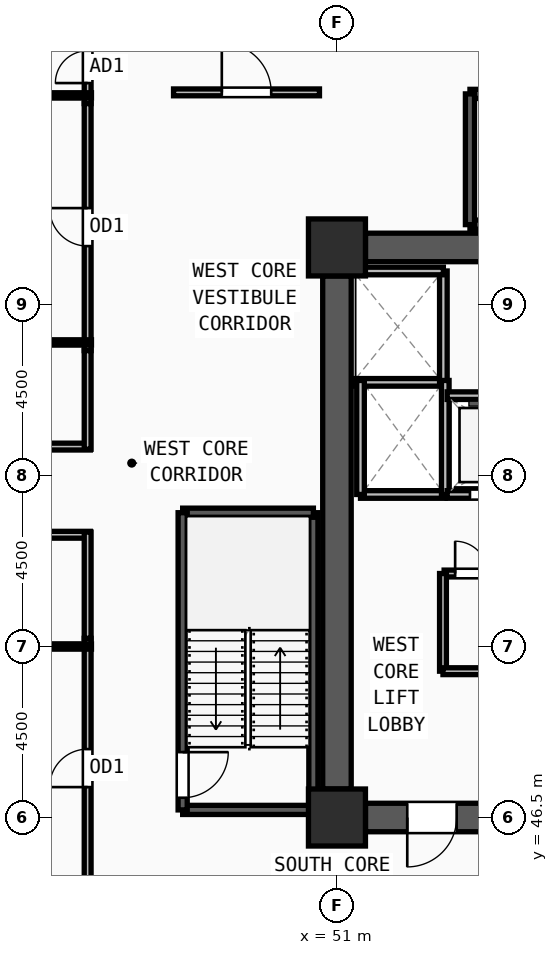
"""IFC4 building model, lengths in metres.
Left out: names, types, materials, properties, quantities, classifications, styles, units other than length and angle.
Written with IfcOpenShell. Run it as: python <this file> out.ifc"""

import sys

from ifc_helpers import new_model, si_unit, direction, frame, frame_2d, origin, origin_2d, place, context, subcontext, project, spatial, rectangle, extrude, source, transform, mapped, element, fill, save


model = new_model("IFC4")
c1 = context("Model", 3, precision=1e-05, world=origin(), true_north=direction((0.0, 1.0)))
c2 = subcontext(c1, "Body", "Model", "MODEL_VIEW")
j1 = project(units=[si_unit("LENGTHUNIT", "METRE"), si_unit("PLANEANGLEUNIT", "RADIAN")], contexts=[c1])
p1 = place(None, origin())
s1 = spatial("IfcSite", under=j1, at=p1, CompositionType="ELEMENT")
p2 = place(p1, origin())
s2 = spatial("IfcBuilding", under=s1, at=p2, CompositionType="ELEMENT")
p3 = place(p2, frame((0.0, 0.0, 135.75)))
s3 = spatial("IfcBuildingStorey", under=s2, at=p3, CompositionType="ELEMENT", Elevation=135.75)
m1 = source(origin(), c2, "Body", "SweptSolid", [
    extrude(rectangle(XDim=1.5, YDim=1.5, at=origin_2d()), origin(), (0.0, 0.0, 1.0), 3.75),
])
for number, where, z_axis, x_axis in (
    (1, (51.0, 46.5, 0.0), (0.0, 0.0, 1.0), (1.0, 0.0, 0.0)),
    (2, (51.0, 61.5, 0.0), (0.0, 0.0, 1.0), (1.0, 0.0, 0.0)),
):
    element("IfcColumn", number, at=place(p3, frame(where, z_axis=z_axis, x_axis=x_axis)), inside=s3, PredefinedType="COLUMN", context=c2, shape_type="MappedRepresentation", body=[
        mapped(m1, transform((0.0, 0.0, 0.0), x_axis=(1.0, 0.0, 0.0), y_axis=(0.0, 1.0, 0.0), z_axis=(0.0, 0.0, 1.0), scale=1.0)),
    ])
p4 = place(p3, frame((51.75, 61.5, 0.0), z_axis=(0.0, 0.0, 1.0), x_axis=(1.0, 0.0, 0.0)))
e3 = element("IfcWall", 3, at=p4, inside=s3, PredefinedType="SHEAR", context=c2, shape_type="SweptSolid", body=[
    extrude(rectangle(XDim=7.5, YDim=0.75, at=frame_2d((3.75, 0.0))), origin(), (0.0, 0.0, 1.0), 3.47),
])
p5 = place(p3, frame((59.25, 46.5, 0.0), z_axis=(0.0, 0.0, 1.0), x_axis=(-1.0, 0.0, 0.0)))
e4 = element("IfcWall", 4, at=p5, inside=s3, PredefinedType="SHEAR", context=c2, shape_type="SweptSolid", body=[
    extrude(rectangle(XDim=7.5, YDim=0.75, at=frame_2d((3.75, 0.0))), origin(), (0.0, 0.0, 1.0), 3.47),
])
m2 = source(origin(), c2, "Body", "SweptSolid", [
    extrude(rectangle(XDim=1.3, YDim=2.2, at=frame_2d((0.65, 1.1))), frame((0.0, 0.385, 0.0), z_axis=(0.0, -1.0, 0.0), x_axis=(1.0, 0.0, 0.0)), (0.0, 0.0, 1.0), 0.77),
])
p6 = place(p5, frame((5.1, 0.0, 0.0)))
e5 = element("IfcOpeningElement", 5, at=p6, cuts=e4, PredefinedType="OPENING", context=c2, shape_type="MappedRepresentation", body=[
    mapped(m2, transform((0.0, 0.0, 0.0), x_axis=(1.0, 0.0, 0.0), y_axis=(0.0, 1.0, 0.0), z_axis=(0.0, 0.0, 1.0), scale=1.0)),
])
m3 = source(origin(), c2, "Body", "SweptSolid", [
    extrude(rectangle(XDim=1.0, YDim=2.2, at=frame_2d((0.5, 1.1))), frame((0.0, 0.385, 0.0), z_axis=(0.0, -1.0, 0.0), x_axis=(1.0, 0.0, 0.0)), (0.0, 0.0, 1.0), 0.77),
])
p7 = place(p5, frame((0.6, 0.0, 0.0)))
e6 = element("IfcOpeningElement", 6, at=p7, cuts=e4, PredefinedType="OPENING", context=c2, shape_type="MappedRepresentation", body=[
    mapped(m3, transform((0.0, 0.0, 0.0), x_axis=(1.0, 0.0, 0.0), y_axis=(0.0, 1.0, 0.0), z_axis=(0.0, 0.0, 1.0), scale=1.0)),
])
p8 = place(p3, frame((51.0, 47.25, 0.0), z_axis=(0.0, 0.0, 1.0), x_axis=(0.0, 1.0, 0.0)))
e7 = element("IfcWall", 7, at=p8, inside=s3, PredefinedType="SHEAR", context=c2, shape_type="SweptSolid", body=[
    extrude(rectangle(XDim=13.5, YDim=0.75, at=frame_2d((6.75, 0.0))), origin(), (0.0, 0.0, 1.0), 3.47),
])
p9 = place(p3, frame((46.94, 46.7, 0.0), z_axis=(0.0, 0.0, 1.0), x_axis=(1.0, 0.0, 0.0)))
e8 = element("IfcWall", 8, at=p9, inside=s3, PredefinedType="SOLIDWALL", context=c2, shape_type="SweptSolid", body=[
    extrude(rectangle(XDim=3.44, YDim=0.24, at=frame_2d((1.72, 0.0))), origin(), (0.0, 0.0, 1.0), 3.47),
])
p10 = place(p3, frame((50.38, 46.7, 0.0), z_axis=(0.0, 0.0, 1.0), x_axis=(0.0, 1.0, 0.0)))
e9 = element("IfcWall", 9, at=p10, inside=s3, PredefinedType="SOLIDWALL", context=c2, shape_type="SweptSolid", body=[
    extrude(rectangle(XDim=7.82, YDim=0.24, at=frame_2d((3.91, 0.0))), origin(), (0.0, 0.0, 1.0), 3.47),
])
p11 = place(p3, frame((50.38, 54.52, 0.0), z_axis=(0.0, 0.0, 1.0), x_axis=(-1.0, 0.0, 0.0)))
e10 = element("IfcWall", 10, at=p11, inside=s3, PredefinedType="SOLIDWALL", context=c2, shape_type="SweptSolid", body=[
    extrude(rectangle(XDim=3.44, YDim=0.24, at=frame_2d((1.72, 0.0))), origin(), (0.0, 0.0, 1.0), 3.47),
])
p12 = place(p3, frame((46.94, 54.52, 0.0), z_axis=(0.0, 0.0, 1.0), x_axis=(0.0, -1.0, 0.0)))
e11 = element("IfcWall", 11, at=p12, inside=s3, PredefinedType="SOLIDWALL", context=c2, shape_type="SweptSolid", body=[
    extrude(rectangle(XDim=7.82, YDim=0.24, at=frame_2d((3.91, 0.0))), origin(), (0.0, 0.0, 1.0), 3.47),
])
m4 = source(origin(), c2, "Body", "SweptSolid", [
    extrude(rectangle(XDim=1.2, YDim=2.2, at=frame_2d((0.6, 1.1))), frame((0.0, 0.13, 0.0), z_axis=(0.0, -1.0, 0.0), x_axis=(1.0, 0.0, 0.0)), (0.0, 0.0, 1.0), 0.26),
])
p13 = place(p12, frame((6.3, 0.0, 0.0)))
e12 = element("IfcOpeningElement", 12, at=p13, cuts=e11, PredefinedType="OPENING", context=c2, shape_type="MappedRepresentation", body=[
    mapped(m4, transform((0.0, 0.0, 0.0), x_axis=(1.0, 0.0, 0.0), y_axis=(0.0, 1.0, 0.0), z_axis=(0.0, 0.0, 1.0), scale=1.0)),
])
p14 = place(p3, frame((54.5, 62.1, 0.0), z_axis=(0.0, 0.0, 1.0), x_axis=(1.0, 0.0, 0.0)))
e13 = element("IfcWall", 13, at=p14, inside=s3, PredefinedType="SOLIDWALL", context=c2, shape_type="SweptSolid", body=[
    extrude(rectangle(XDim=7.82, YDim=0.24, at=frame_2d((3.91, 0.0))), origin(), (0.0, 0.0, 1.0), 3.47),
])
p15 = place(p3, frame((62.32, 65.54, 0.0), z_axis=(0.0, 0.0, 1.0), x_axis=(-1.0, 0.0, 0.0)))
e14 = element("IfcWall", 14, at=p15, inside=s3, PredefinedType="SOLIDWALL", context=c2, shape_type="SweptSolid", body=[
    extrude(rectangle(XDim=7.82, YDim=0.24, at=frame_2d((3.91, 0.0))), origin(), (0.0, 0.0, 1.0), 3.47),
])
p16 = place(p15, frame((6.3, 0.0, 0.0)))
e15 = element("IfcOpeningElement", 15, at=p16, cuts=e14, PredefinedType="OPENING", context=c2, shape_type="MappedRepresentation", body=[
    mapped(m4, transform((0.0, 0.0, 0.0), x_axis=(1.0, 0.0, 0.0), y_axis=(0.0, 1.0, 0.0), z_axis=(0.0, 0.0, 1.0), scale=1.0)),
])
p17 = place(p3, frame((54.5, 65.54, 0.0), z_axis=(0.0, 0.0, 1.0), x_axis=(0.0, -1.0, 0.0)))
e16 = element("IfcWall", 16, at=p17, inside=s3, PredefinedType="SOLIDWALL", context=c2, shape_type="SweptSolid", body=[
    extrude(rectangle(XDim=3.44, YDim=0.24, at=frame_2d((1.72, 0.0))), origin(), (0.0, 0.0, 1.0), 3.47),
])
p18 = place(p3, frame((51.4, 57.95, 0.0), z_axis=(0.0, 0.0, 1.0), x_axis=(1.0, 0.0, 0.0)))
e17 = element("IfcWall", 17, at=p18, inside=s3, PredefinedType="SOLIDWALL", context=c2, shape_type="SweptSolid", body=[
    extrude(rectangle(XDim=2.4, YDim=0.2, at=frame_2d((1.2, 0.0))), origin(), (0.0, 0.0, 1.0), 3.47),
])
p19 = place(p3, frame((53.8, 57.95, 0.0), z_axis=(0.0, 0.0, 1.0), x_axis=(0.0, 1.0, 0.0)))
e18 = element("IfcWall", 18, at=p19, inside=s3, PredefinedType="SOLIDWALL", context=c2, shape_type="SweptSolid", body=[
    extrude(rectangle(XDim=2.93, YDim=0.2, at=frame_2d((1.465, 0.0))), origin(), (0.0, 0.0, 1.0), 3.47),
])
p20 = place(p3, frame((53.8, 60.88, 0.0), z_axis=(0.0, 0.0, 1.0), x_axis=(-1.0, 0.0, 0.0)))
e19 = element("IfcWall", 19, at=p20, inside=s3, PredefinedType="SOLIDWALL", context=c2, shape_type="SweptSolid", body=[
    extrude(rectangle(XDim=2.4, YDim=0.2, at=frame_2d((1.2, 0.0))), origin(), (0.0, 0.0, 1.0), 3.47),
])
p21 = place(p3, frame((51.62, 55.0, 0.0), z_axis=(0.0, 0.0, 1.0), x_axis=(1.0, 0.0, 0.0)))
e20 = element("IfcWall", 20, at=p21, inside=s3, PredefinedType="SOLIDWALL", context=c2, shape_type="SweptSolid", body=[
    extrude(rectangle(XDim=2.23, YDim=0.2, at=frame_2d((1.115, 0.0))), origin(), (0.0, 0.0, 1.0), 3.47),
])
for number, where, z_axis, x_axis in (
    (21, (53.85, 55.0, 0.0), (0.0, 0.0, 1.0), (0.0, 1.0, 0.0)),
    (22, (51.62, 58.0, 0.0), (0.0, 0.0, 1.0), (0.0, -1.0, 0.0)),
):
    element("IfcWall", number, at=place(p3, frame(where, z_axis=z_axis, x_axis=x_axis)), inside=s3, PredefinedType="SOLIDWALL", context=c2, shape_type="SweptSolid", body=[
        extrude(rectangle(XDim=3.0, YDim=0.2, at=frame_2d((1.5, 0.0))), origin(), (0.0, 0.0, 1.0), 3.47),
    ])
p22 = place(p3, frame((53.9, 55.0, 0.0), z_axis=(0.0, 0.0, 1.0), x_axis=(1.0, 0.0, 0.0)))
e23 = element("IfcWall", 23, at=p22, inside=s3, PredefinedType="SOLIDWALL", context=c2, shape_type="SweptSolid", body=[
    extrude(rectangle(XDim=2.3, YDim=0.2, at=frame_2d((1.15, 0.0))), origin(), (0.0, 0.0, 1.0), 3.47),
])
m5 = source(origin(), c2, "Body", "SweptSolid", [
    extrude(rectangle(XDim=1.1, YDim=2.2, at=frame_2d((0.55, 1.1))), frame((0.0, 0.11, 0.0), z_axis=(0.0, -1.0, 0.0), x_axis=(1.0, 0.0, 0.0)), (0.0, 0.0, 1.0), 0.22),
])
p23 = place(p22, frame((0.6, 0.0, 0.0)))
e24 = element("IfcOpeningElement", 24, at=p23, cuts=e23, PredefinedType="OPENING", context=c2, shape_type="MappedRepresentation", body=[
    mapped(m5, transform((0.0, 0.0, 0.0), x_axis=(1.0, 0.0, 0.0), y_axis=(0.0, 1.0, 0.0), z_axis=(0.0, 0.0, 1.0), scale=1.0)),
])
p24 = place(p3, frame((56.2, 57.6, 0.0), z_axis=(0.0, 0.0, 1.0), x_axis=(-1.0, 0.0, 0.0)))
e25 = element("IfcWall", 25, at=p24, inside=s3, PredefinedType="SOLIDWALL", context=c2, shape_type="SweptSolid", body=[
    extrude(rectangle(XDim=2.3, YDim=0.2, at=frame_2d((1.15, 0.0))), origin(), (0.0, 0.0, 1.0), 3.47),
])
p25 = place(p3, frame((53.82, 52.92, 0.0), z_axis=(0.0, 0.0, 1.0), x_axis=(1.0, 0.0, 0.0)))
e26 = element("IfcWall", 26, at=p25, inside=s3, PredefinedType="PARTITIONING", context=c2, shape_type="SweptSolid", body=[
    extrude(rectangle(XDim=1.43, YDim=0.18, at=frame_2d((0.715, 0.0))), origin(), (0.0, 0.0, 1.0), 3.47),
])
m6 = source(origin(), c2, "Body", "SweptSolid", [
    extrude(rectangle(XDim=0.85, YDim=2.1, at=frame_2d((0.425, 1.05))), frame((0.0, 0.1, 0.0), z_axis=(0.0, -1.0, 0.0), x_axis=(1.0, 0.0, 0.0)), (0.0, 0.0, 1.0), 0.2),
])
p26 = place(p25, frame((0.29, 0.0, 0.0)))
e27 = element("IfcOpeningElement", 27, at=p26, cuts=e26, PredefinedType="OPENING", context=c2, shape_type="MappedRepresentation", body=[
    mapped(m6, transform((0.0, 0.0, 0.0), x_axis=(1.0, 0.0, 0.0), y_axis=(0.0, 1.0, 0.0), z_axis=(0.0, 0.0, 1.0), scale=1.0)),
])
p27 = place(p3, frame((46.7, 65.58, 0.0), z_axis=(0.0, 0.0, 1.0), x_axis=(1.0, 0.0, 0.0)))
e28 = element("IfcWall", 28, at=p27, inside=s3, PredefinedType="PARTITIONING", context=c2, shape_type="SweptSolid", body=[
    extrude(rectangle(XDim=3.84, YDim=0.18, at=frame_2d((1.92, 0.0))), origin(), (0.0, 0.0, 1.0), 3.47),
])
m7 = source(origin(), c2, "Body", "SweptSolid", [
    extrude(rectangle(XDim=1.3, YDim=2.2, at=frame_2d((0.65, 1.1))), frame((0.0, 0.1, 0.0), z_axis=(0.0, -1.0, 0.0), x_axis=(1.0, 0.0, 0.0)), (0.0, 0.0, 1.0), 0.2),
])
p28 = place(p27, frame((1.27, 0.0, 0.0)))
e29 = element("IfcOpeningElement", 29, at=p28, cuts=e28, PredefinedType="OPENING", context=c2, shape_type="MappedRepresentation", body=[
    mapped(m7, transform((0.0, 0.0, 0.0), x_axis=(1.0, 0.0, 0.0), y_axis=(0.0, 1.0, 0.0), z_axis=(0.0, 0.0, 1.0), scale=1.0)),
])
p29 = place(p3, frame((44.44, 65.285, 0.0), z_axis=(0.0, 0.0, 1.0), x_axis=(0.0, 1.0, 0.0)))
e30 = element("IfcWall", 30, at=p29, inside=s3, PredefinedType="PARTITIONING", context=c2, shape_type="SweptSolid", body=[
    extrude(rectangle(XDim=1.93, YDim=0.18, at=frame_2d((0.965, 0.0))), origin(), (0.0, 0.0, 1.0), 3.47),
])
p30 = place(p29, frame((0.54, 0.0, 0.0)))
e31 = element("IfcOpeningElement", 31, at=p30, cuts=e30, PredefinedType="OPENING", context=c2, shape_type="MappedRepresentation", body=[
    mapped(m6, transform((0.0, 0.0, 0.0), x_axis=(1.0, 0.0, 0.0), y_axis=(0.0, 1.0, 0.0), z_axis=(0.0, 0.0, 1.0), scale=1.0)),
])
p31 = place(p3, frame((44.44, 58.785, 0.0), z_axis=(0.0, 0.0, 1.0), x_axis=(0.0, 1.0, 0.0)))
e32 = element("IfcWall", 32, at=p31, inside=s3, PredefinedType="PARTITIONING", context=c2, shape_type="SweptSolid", body=[
    extrude(rectangle(XDim=6.5, YDim=0.18, at=frame_2d((3.25, 0.0))), origin(), (0.0, 0.0, 1.0), 3.47),
])
m8 = source(origin(), c2, "Body", "SweptSolid", [
    extrude(rectangle(XDim=1.0, YDim=2.2, at=frame_2d((0.5, 1.1))), frame((0.0, 0.1, 0.0), z_axis=(0.0, -1.0, 0.0), x_axis=(1.0, 0.0, 0.0)), (0.0, 0.0, 1.0), 0.2),
])
p32 = place(p31, frame((2.75, 0.0, 0.0)))
e33 = element("IfcOpeningElement", 33, at=p32, cuts=e32, PredefinedType="OPENING", context=c2, shape_type="MappedRepresentation", body=[
    mapped(m8, transform((0.0, 0.0, 0.0), x_axis=(1.0, 0.0, 0.0), y_axis=(0.0, 1.0, 0.0), z_axis=(0.0, 0.0, 1.0), scale=1.0)),
])
p33 = place(p3, frame((29.414, 56.26, 0.0), z_axis=(0.0, 0.0, 1.0), x_axis=(1.0, 0.0, 0.0)))
e34 = element("IfcWall", 34, at=p33, inside=s3, PredefinedType="PARTITIONING", context=c2, shape_type="SweptSolid", body=[
    extrude(rectangle(XDim=15.096, YDim=0.18, at=frame_2d((7.548, 0.0))), origin(), (0.0, 0.0, 1.0), 3.47),
])
p34 = place(p33, frame((7.048, 0.0, 0.0)))
e35 = element("IfcOpeningElement", 35, at=p34, cuts=e34, PredefinedType="OPENING", context=c2, shape_type="MappedRepresentation", body=[
    mapped(m8, transform((0.0, 0.0, 0.0), x_axis=(1.0, 0.0, 0.0), y_axis=(0.0, 1.0, 0.0), z_axis=(0.0, 0.0, 1.0), scale=1.0)),
])
p35 = place(p3, frame((44.51, 53.94, 0.0), z_axis=(0.0, 0.0, 1.0), x_axis=(-1.0, 0.0, 0.0)))
e36 = element("IfcWall", 36, at=p35, inside=s3, PredefinedType="PARTITIONING", context=c2, shape_type="SweptSolid", body=[
    extrude(rectangle(XDim=13.933, YDim=0.18, at=frame_2d((6.967, 0.0))), origin(), (0.0, 0.0, 1.0), 3.47),
])
p36 = place(p35, frame((6.466, 0.0, 0.0)))
e37 = element("IfcOpeningElement", 37, at=p36, cuts=e36, PredefinedType="OPENING", context=c2, shape_type="MappedRepresentation", body=[
    mapped(m8, transform((0.0, 0.0, 0.0), x_axis=(1.0, 0.0, 0.0), y_axis=(0.0, 1.0, 0.0), z_axis=(0.0, 0.0, 1.0), scale=1.0)),
])
p37 = place(p3, frame((44.44, 44.385, 0.0), z_axis=(0.0, 0.0, 1.0), x_axis=(0.0, 1.0, 0.0)))
e38 = element("IfcWall", 38, at=p37, inside=s3, PredefinedType="PARTITIONING", context=c2, shape_type="SweptSolid", body=[
    extrude(rectangle(XDim=6.83, YDim=0.18, at=frame_2d((3.415, 0.0))), origin(), (0.0, 0.0, 1.0), 3.47),
])
p38 = place(p37, frame((2.915, 0.0, 0.0)))
e39 = element("IfcOpeningElement", 39, at=p38, cuts=e38, PredefinedType="OPENING", context=c2, shape_type="MappedRepresentation", body=[
    mapped(m8, transform((0.0, 0.0, 0.0), x_axis=(1.0, 0.0, 0.0), y_axis=(0.0, 1.0, 0.0), z_axis=(0.0, 0.0, 1.0), scale=1.0)),
])
p39 = place(p3, frame((53.79, 50.35, 0.0), z_axis=(0.0, 0.0, 1.0), x_axis=(0.0, 1.0, 0.0)))
e40 = element("IfcWall", 40, at=p39, inside=s3, PredefinedType="PARTITIONING", context=c2, shape_type="SweptSolid", body=[
    extrude(rectangle(XDim=2.57, YDim=0.18, at=frame_2d((1.285, 0.0))), origin(), (0.0, 0.0, 1.0), 3.47),
])
p40 = place(p3, frame((53.79, 50.35, 0.0), z_axis=(0.0, 0.0, 1.0), x_axis=(1.0, 0.0, 0.0)))
e41 = element("IfcWall", 41, at=p40, inside=s3, PredefinedType="PARTITIONING", context=c2, shape_type="SweptSolid", body=[
    extrude(rectangle(XDim=1.49, YDim=0.18, at=frame_2d((0.745, 0.0))), origin(), (0.0, 0.0, 1.0), 3.47),
])
p41 = place(p3, frame((44.44, 56.19, 0.0), z_axis=(0.0, 0.0, 1.0), x_axis=(0.0, 1.0, 0.0)))
e42 = element("IfcWall", 42, at=p41, inside=s3, PredefinedType="PARTITIONING", context=c2, shape_type="SweptSolid", body=[
    extrude(rectangle(XDim=2.595, YDim=0.18, at=frame_2d((1.297, 0.0))), origin(), (0.0, 0.0, 1.0), 3.47),
])
p42 = place(p3, frame((44.44, 51.215, 0.0), z_axis=(0.0, 0.0, 1.0), x_axis=(0.0, 1.0, 0.0)))
e43 = element("IfcWall", 43, at=p42, inside=s3, PredefinedType="PARTITIONING", context=c2, shape_type="SweptSolid", body=[
    extrude(rectangle(XDim=2.795, YDim=0.18, at=frame_2d((1.397, 0.0))), origin(), (0.0, 0.0, 1.0), 3.47),
])
p43 = place(p3, frame((44.54, 51.0, 0.0), z_axis=(0.0, 0.0, 1.0), x_axis=(-1.0, 0.0, 0.0)))
e44 = element("IfcWall", 44, at=p43, inside=s3, PredefinedType="PARTITIONING", context=c2, shape_type="SweptSolid", body=[
    extrude(rectangle(XDim=12.598, YDim=0.14, at=frame_2d((6.299, 0.0))), origin(), (0.0, 0.0, 1.0), 3.47),
])
p44 = place(p3, frame((44.54, 59.0, 0.0), z_axis=(0.0, 0.0, 1.0), x_axis=(-1.0, 0.0, 0.0)))
e45 = element("IfcWall", 45, at=p44, inside=s3, PredefinedType="PARTITIONING", context=c2, shape_type="SweptSolid", body=[
    extrude(rectangle(XDim=16.608, YDim=0.14, at=frame_2d((8.304, 0.0))), origin(), (0.0, 0.0, 1.0), 3.47),
])
p45 = place(p3, frame((44.54, 65.5, 0.0), z_axis=(0.0, 0.0, 1.0), x_axis=(-1.0, 0.0, 0.0)))
e46 = element("IfcWall", 46, at=p45, inside=s3, PredefinedType="PARTITIONING", context=c2, shape_type="SweptSolid", body=[
    extrude(rectangle(XDim=19.867, YDim=0.14, at=frame_2d((9.934, 0.0))), origin(), (0.0, 0.0, 1.0), 2.655),
])
m9 = source(origin(), c2, "Body", "SweptSolid", [
    extrude(rectangle(XDim=1.3, YDim=2.2, at=frame_2d((0.65, 1.1))), frame((0.0, 0.025, 0.0), z_axis=(0.0, -1.0, 0.0), x_axis=(1.0, 0.0, 0.0)), (0.0, 0.0, 1.0), 0.05),
])
p46 = place(p6, origin())
e47 = element("IfcDoor", 47, at=p46, inside=s3, OperationType="SINGLE_SWING_RIGHT", PredefinedType="DOOR", context=c2, shape_type="MappedRepresentation", body=[
    mapped(m9, transform((0.0, 0.0, 0.0), x_axis=(1.0, 0.0, 0.0), y_axis=(0.0, 1.0, 0.0), z_axis=(0.0, 0.0, 1.0), scale=1.0)),
])
fill(e5, e47)
m10 = source(origin(), c2, "Body", "SweptSolid", [
    extrude(rectangle(XDim=1.2, YDim=2.2, at=frame_2d((0.6, 1.1))), frame((0.0, 0.025, 0.0), z_axis=(0.0, -1.0, 0.0), x_axis=(1.0, 0.0, 0.0)), (0.0, 0.0, 1.0), 0.05),
])
p47 = place(p13, origin())
e48 = element("IfcDoor", 48, at=p47, inside=s3, OperationType="SINGLE_SWING_LEFT", PredefinedType="DOOR", context=c2, shape_type="MappedRepresentation", body=[
    mapped(m10, transform((0.0, 0.0, 0.0), x_axis=(1.0, 0.0, 0.0), y_axis=(0.0, 1.0, 0.0), z_axis=(0.0, 0.0, 1.0), scale=1.0)),
])
fill(e12, e48)
m11 = source(origin(), c2, "Body", "SweptSolid", [
    extrude(rectangle(XDim=1.1, YDim=2.2, at=frame_2d((0.55, 1.1))), frame((0.0, 0.025, 0.0), z_axis=(0.0, -1.0, 0.0), x_axis=(1.0, 0.0, 0.0)), (0.0, 0.0, 1.0), 0.05),
])
p48 = place(p23, origin())
e49 = element("IfcDoor", 49, at=p48, inside=s3, OperationType="SLIDING_TO_LEFT", PredefinedType="DOOR", context=c2, shape_type="MappedRepresentation", body=[
    mapped(m11, transform((0.0, 0.0, 0.0), x_axis=(1.0, 0.0, 0.0), y_axis=(0.0, 1.0, 0.0), z_axis=(0.0, 0.0, 1.0), scale=1.0)),
])
fill(e24, e49)
m12 = source(origin(), c2, "Body", "SweptSolid", [
    extrude(rectangle(XDim=0.85, YDim=2.1, at=frame_2d((0.425, 1.05))), frame((0.0, 0.025, 0.0), z_axis=(0.0, -1.0, 0.0), x_axis=(1.0, 0.0, 0.0)), (0.0, 0.0, 1.0), 0.05),
])
p49 = place(p26, origin())
e50 = element("IfcDoor", 50, at=p49, inside=s3, OperationType="SINGLE_SWING_LEFT", PredefinedType="DOOR", context=c2, shape_type="MappedRepresentation", body=[
    mapped(m12, transform((0.0, 0.0, 0.0), x_axis=(1.0, 0.0, 0.0), y_axis=(0.0, 1.0, 0.0), z_axis=(0.0, 0.0, 1.0), scale=1.0)),
])
fill(e27, e50)
p50 = place(p28, origin())
e51 = element("IfcDoor", 51, at=p50, inside=s3, OperationType="SINGLE_SWING_LEFT", PredefinedType="DOOR", context=c2, shape_type="MappedRepresentation", body=[
    mapped(m9, transform((0.0, 0.0, 0.0), x_axis=(1.0, 0.0, 0.0), y_axis=(0.0, 1.0, 0.0), z_axis=(0.0, 0.0, 1.0), scale=1.0)),
])
fill(e29, e51)
p51 = place(p30, origin())
e52 = element("IfcDoor", 52, at=p51, inside=s3, OperationType="SINGLE_SWING_LEFT", PredefinedType="DOOR", context=c2, shape_type="MappedRepresentation", body=[
    mapped(m12, transform((0.0, 0.0, 0.0), x_axis=(1.0, 0.0, 0.0), y_axis=(0.0, 1.0, 0.0), z_axis=(0.0, 0.0, 1.0), scale=1.0)),
])
fill(e31, e52)
m13 = source(origin(), c2, "Body", "SweptSolid", [
    extrude(rectangle(XDim=1.0, YDim=2.2, at=frame_2d((0.5, 1.1))), frame((0.0, 0.025, 0.0), z_axis=(0.0, -1.0, 0.0), x_axis=(1.0, 0.0, 0.0)), (0.0, 0.0, 1.0), 0.05),
])
p52 = place(p32, origin())
e53 = element("IfcDoor", 53, at=p52, inside=s3, OperationType="SINGLE_SWING_RIGHT", PredefinedType="DOOR", context=c2, shape_type="MappedRepresentation", body=[
    mapped(m13, transform((0.0, 0.0, 0.0), x_axis=(1.0, 0.0, 0.0), y_axis=(0.0, 1.0, 0.0), z_axis=(0.0, 0.0, 1.0), scale=1.0)),
])
fill(e33, e53)
p53 = place(p38, origin())
e54 = element("IfcDoor", 54, at=p53, inside=s3, OperationType="SINGLE_SWING_LEFT", PredefinedType="DOOR", context=c2, shape_type="MappedRepresentation", body=[
    mapped(m13, transform((0.0, 0.0, 0.0), x_axis=(1.0, 0.0, 0.0), y_axis=(0.0, 1.0, 0.0), z_axis=(0.0, 0.0, 1.0), scale=1.0)),
])
fill(e39, e54)
save(model, sys.argv[1])
